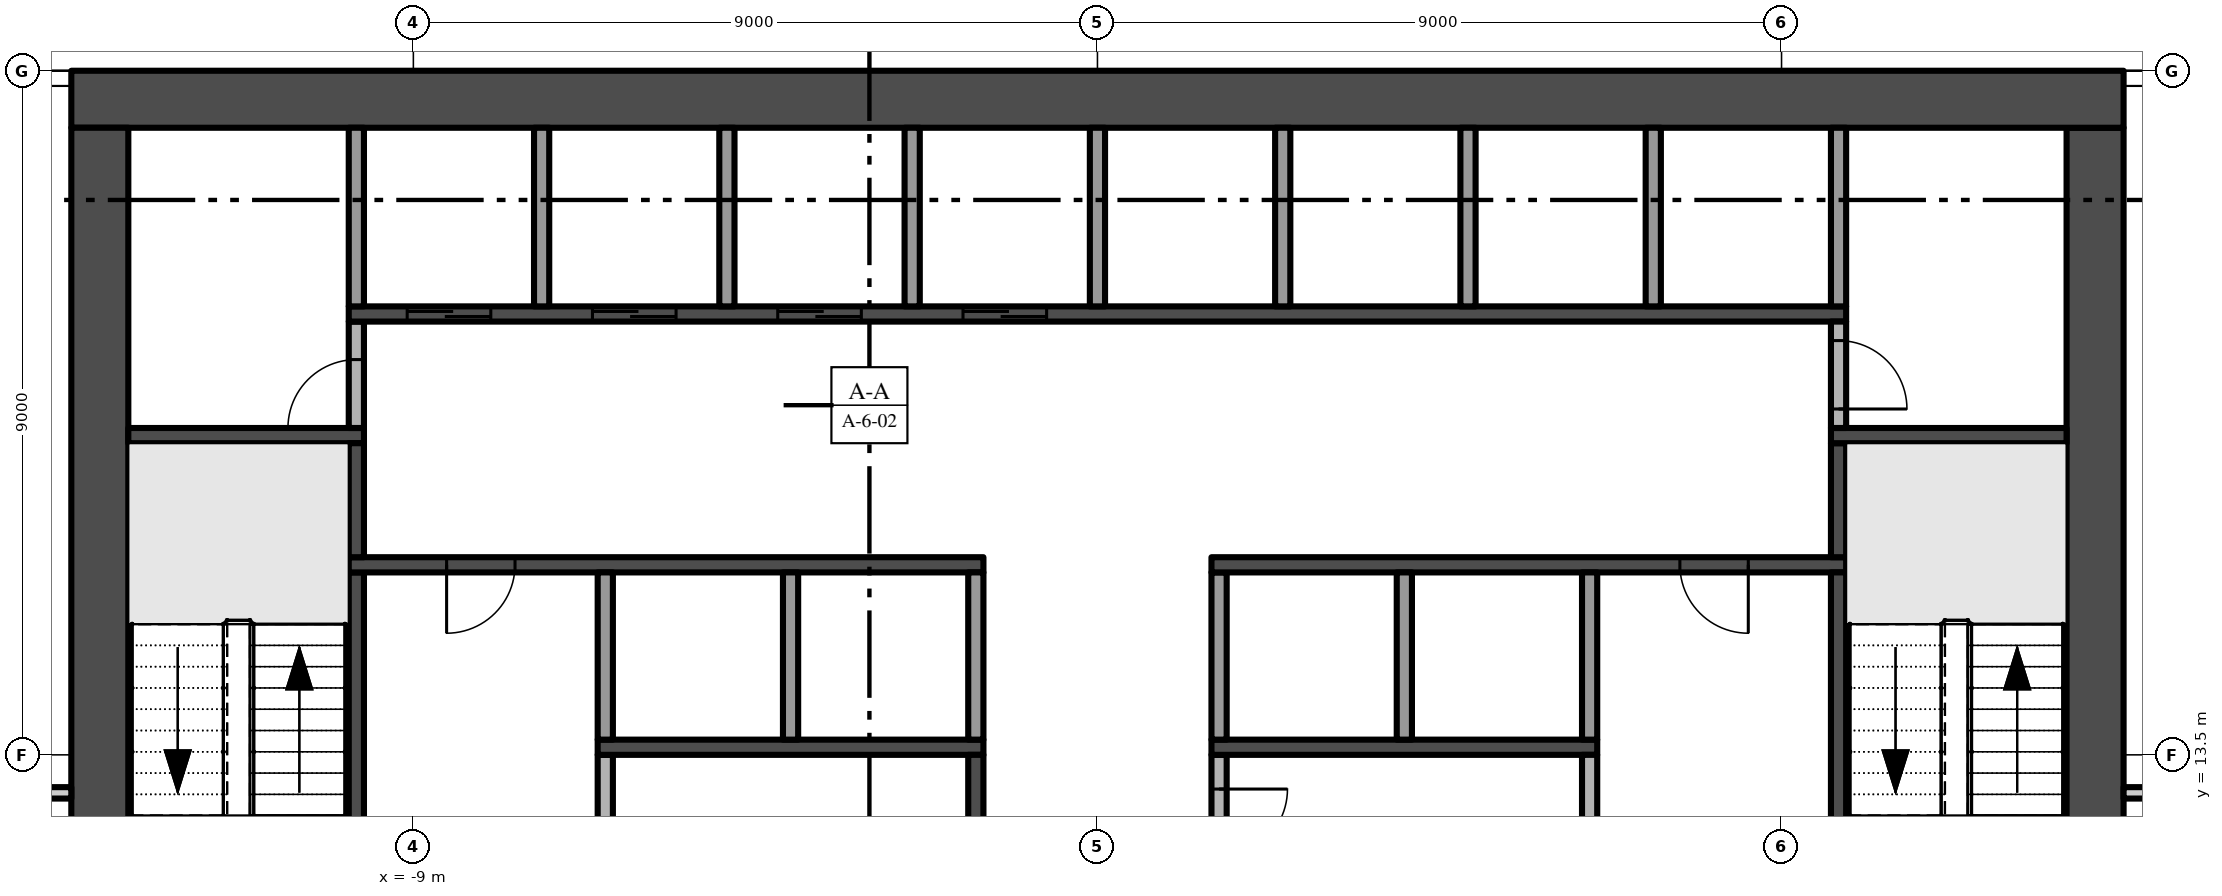
"""IFC4 building model, lengths in metres.
Left out: names, types, materials, properties, quantities, classifications, styles, units other than length and angle.
Written with IfcOpenShell. Run it as: python <this file> out.ifc"""

import sys

from ifc_helpers import new_model, si_unit, direction, frame, frame_2d, origin, place, context, subcontext, project, spatial, rectangle, extrude, element, fill, save


model = new_model("IFC4")
c1 = context("Model", 3, precision=1e-05, world=origin(), true_north=direction((0.0, 1.0)))
c2 = subcontext(c1, "Body", "Model", "MODEL_VIEW")
j1 = project(units=[si_unit("LENGTHUNIT", "METRE"), si_unit("PLANEANGLEUNIT", "RADIAN")], contexts=[c1])
p1 = place(None, origin())
s1 = spatial("IfcSite", under=j1, at=p1, CompositionType="ELEMENT")
p2 = place(p1, origin())
s2 = spatial("IfcBuilding", under=s1, at=p2, CompositionType="ELEMENT")
p3 = place(p2, frame((0.0, 0.0, 115.0)))
s3 = spatial("IfcBuildingStorey", under=s2, at=p3, CompositionType="ELEMENT", Elevation=115.0)
p4 = place(p3, frame((13.125, 5.25, -0.3), z_axis=(0.0, 0.0, 1.0), x_axis=(0.0, 1.0, 0.0)))
e1 = element("IfcWall", 1, at=p4, inside=s3, PredefinedType="SHEAR", context=c2, shape_type="SweptSolid", body=[
    extrude(rectangle(XDim=16.5, YDim=0.75, at=frame_2d((8.25, 0.0))), origin(), (0.0, 0.0, 1.0), 5.0),
])
p5 = place(p4, frame((6.15, 0.0, 0.3)))
e2 = element("IfcOpeningElement", 2, at=p5, cuts=e1, PredefinedType="OPENING", context=c2, shape_type="SweptSolid", body=[
    extrude(rectangle(XDim=1.2, YDim=2.2, at=frame_2d((0.6, 1.1))), frame((0.0, 0.385, 0.0), z_axis=(0.0, -1.0, 0.0), x_axis=(1.0, 0.0, 0.0)), (0.0, 0.0, 1.0), 0.77),
])
p6 = place(p3, frame((13.5, 22.125, -0.3), z_axis=(0.0, 0.0, 1.0), x_axis=(-1.0, 0.0, 0.0)))
e3 = element("IfcWall", 3, at=p6, inside=s3, PredefinedType="SHEAR", context=c2, shape_type="SweptSolid", body=[
    extrude(rectangle(XDim=27.0, YDim=0.75, at=frame_2d((13.5, 0.0))), origin(), (0.0, 0.0, 1.0), 5.0),
])
p7 = place(p3, frame((-13.125, 21.75, -0.3), z_axis=(0.0, 0.0, 1.0), x_axis=(0.0, -1.0, 0.0)))
e4 = element("IfcWall", 4, at=p7, inside=s3, PredefinedType="SHEAR", context=c2, shape_type="SweptSolid", body=[
    extrude(rectangle(XDim=16.5, YDim=0.75, at=frame_2d((8.25, 0.0))), origin(), (0.0, 0.0, 1.0), 5.0),
])
p8 = place(p7, frame((9.15, 0.0, 0.3)))
e5 = element("IfcOpeningElement", 5, at=p8, cuts=e4, PredefinedType="OPENING", context=c2, shape_type="SweptSolid", body=[
    extrude(rectangle(XDim=1.2, YDim=2.2, at=frame_2d((0.6, 1.1))), frame((0.0, 0.385, 0.0), z_axis=(0.0, -1.0, 0.0), x_axis=(1.0, 0.0, 0.0)), (0.0, 0.0, 1.0), 0.77),
])
p9 = place(p3, frame((-12.75, 17.7, 0.0), z_axis=(0.0, 0.0, 1.0), x_axis=(1.0, 0.0, 0.0)))
e6 = element("IfcWall", 6, at=p9, inside=s3, PredefinedType="SHEAR", context=c2, shape_type="SweptSolid", body=[
    extrude(rectangle(XDim=3.1, YDim=0.2, at=frame_2d((1.55, 0.0))), origin(), (0.0, 0.0, 1.0), 4.7),
])
p10 = place(p3, frame((-9.75, 10.2, 0.0), z_axis=(0.0, 0.0, 1.0), x_axis=(0.0, 1.0, 0.0)))
e7 = element("IfcWall", 7, at=p10, inside=s3, PredefinedType="SHEAR", context=c2, shape_type="SweptSolid", body=[
    extrude(rectangle(XDim=5.7, YDim=0.2, at=frame_2d((2.85, 0.0))), origin(), (0.0, 0.0, 1.0), 4.7),
])
p11 = place(p3, frame((-1.5, 16.0, 0.0), z_axis=(0.0, 0.0, 1.0), x_axis=(-1.0, 0.0, 0.0)))
e8 = element("IfcWall", 8, at=p11, inside=s3, PredefinedType="SHEAR", context=c2, shape_type="SweptSolid", body=[
    extrude(rectangle(XDim=8.35, YDim=0.2, at=frame_2d((4.175, 0.0))), origin(), (0.0, 0.0, 1.0), 4.7),
])
p12 = place(p11, frame((6.162, 0.0, 0.0)))
e9 = element("IfcOpeningElement", 9, at=p12, cuts=e8, PredefinedType="OPENING", context=c2, shape_type="SweptSolid", body=[
    extrude(rectangle(XDim=0.9, YDim=2.1, at=frame_2d((0.45, 1.05))), frame((0.0, 0.11, 0.0), z_axis=(0.0, -1.0, 0.0), x_axis=(1.0, 0.0, 0.0)), (0.0, 0.0, 1.0), 0.22),
])
p13 = place(p3, frame((-9.75, 16.1, 0.0), z_axis=(0.0, 0.0, 1.0), x_axis=(0.0, 1.0, 0.0)))
e10 = element("IfcWall", 10, at=p13, inside=s3, PredefinedType="SHEAR", context=c2, shape_type="SweptSolid", body=[
    extrude(rectangle(XDim=1.5, YDim=0.2, at=frame_2d((0.75, 0.0))), origin(), (0.0, 0.0, 1.0), 4.7),
])
p14 = place(p3, frame((-9.75, 17.8, 0.0), z_axis=(0.0, 0.0, 1.0), x_axis=(0.0, 1.0, 0.0)))
e11 = element("IfcWall", 11, at=p14, inside=s3, PredefinedType="PARTITIONING", context=c2, shape_type="SweptSolid", body=[
    extrude(rectangle(XDim=1.4, YDim=0.2, at=frame_2d((0.7, 0.0))), origin(), (0.0, 0.0, 1.0), 4.7),
])
p15 = place(p14, origin())
e12 = element("IfcOpeningElement", 12, at=p15, cuts=e11, PredefinedType="OPENING", context=c2, shape_type="SweptSolid", body=[
    extrude(rectangle(XDim=0.9, YDim=2.1, at=frame_2d((0.45, 1.05))), frame((0.0, 0.11, 0.0), z_axis=(0.0, -1.0, 0.0), x_axis=(1.0, 0.0, 0.0)), (0.0, 0.0, 1.0), 0.22),
])
p16 = place(p3, frame((-9.85, 19.3, 0.0), z_axis=(0.0, 0.0, 1.0), x_axis=(1.0, 0.0, 0.0)))
e13 = element("IfcWall", 13, at=p16, inside=s3, PredefinedType="SHEAR", context=c2, shape_type="SweptSolid", body=[
    extrude(rectangle(XDim=19.7, YDim=0.2, at=frame_2d((9.85, 0.0))), origin(), (0.0, 0.0, 1.0), 4.7),
])
p17 = place(p16, frame((0.769, 0.0, 0.0)))
e14 = element("IfcOpeningElement", 14, at=p17, cuts=e13, PredefinedType="OPENING", context=c2, shape_type="SweptSolid", body=[
    extrude(rectangle(XDim=1.1, YDim=2.1, at=frame_2d((0.55, 1.05))), frame((0.0, 0.11, 0.0), z_axis=(0.0, -1.0, 0.0), x_axis=(1.0, 0.0, 0.0)), (0.0, 0.0, 1.0), 0.22),
])
p18 = place(p16, frame((3.206, 0.0, 0.0)))
e15 = element("IfcOpeningElement", 15, at=p18, cuts=e13, PredefinedType="OPENING", context=c2, shape_type="SweptSolid", body=[
    extrude(rectangle(XDim=1.1, YDim=2.1, at=frame_2d((0.55, 1.05))), frame((0.0, 0.11, 0.0), z_axis=(0.0, -1.0, 0.0), x_axis=(1.0, 0.0, 0.0)), (0.0, 0.0, 1.0), 0.22),
])
p19 = place(p16, frame((5.644, 0.0, 0.0)))
e16 = element("IfcOpeningElement", 16, at=p19, cuts=e13, PredefinedType="OPENING", context=c2, shape_type="SweptSolid", body=[
    extrude(rectangle(XDim=1.1, YDim=2.1, at=frame_2d((0.55, 1.05))), frame((0.0, 0.11, 0.0), z_axis=(0.0, -1.0, 0.0), x_axis=(1.0, 0.0, 0.0)), (0.0, 0.0, 1.0), 0.22),
])
p20 = place(p16, frame((8.081, 0.0, 0.0)))
e17 = element("IfcOpeningElement", 17, at=p20, cuts=e13, PredefinedType="OPENING", context=c2, shape_type="SweptSolid", body=[
    extrude(rectangle(XDim=1.1, YDim=2.1, at=frame_2d((0.55, 1.05))), frame((0.0, 0.11, 0.0), z_axis=(0.0, -1.0, 0.0), x_axis=(1.0, 0.0, 0.0)), (0.0, 0.0, 1.0), 0.22),
])
for number, where, z_axis, x_axis in (
    (18, (-9.75, 19.4, 0.0), (0.0, 0.0, 1.0), (0.0, 1.0, 0.0)),
    (19, (-7.312, 19.4, 0.0), (0.0, 0.0, 1.0), (0.0, 1.0, 0.0)),
):
    element("IfcWall", number, at=place(p3, frame(where, z_axis=z_axis, x_axis=x_axis)), inside=s3, PredefinedType="PARTITIONING", context=c2, shape_type="SweptSolid", body=[
        extrude(rectangle(XDim=2.35, YDim=0.2, at=frame_2d((1.175, 0.0))), origin(), (0.0, 0.0, 1.0), 4.7),
    ])
p21 = place(p3, frame((-6.475, 8.15, 0.0), z_axis=(0.0, 0.0, 1.0), x_axis=(0.0, 1.0, 0.0)))
e20 = element("IfcWall", 20, at=p21, inside=s3, PredefinedType="PARTITIONING", context=c2, shape_type="SweptSolid", body=[
    extrude(rectangle(XDim=5.35, YDim=0.2, at=frame_2d((2.675, 0.0))), origin(), (0.0, 0.0, 1.0), 4.7),
])
p22 = place(p3, frame((-6.575, 13.6, 0.0), z_axis=(0.0, 0.0, 1.0), x_axis=(1.0, 0.0, 0.0)))
e21 = element("IfcWall", 21, at=p22, inside=s3, PredefinedType="SHEAR", context=c2, shape_type="SweptSolid", body=[
    extrude(rectangle(XDim=5.075, YDim=0.2, at=frame_2d((2.538, 0.0))), origin(), (0.0, 0.0, 1.0), 4.7),
])
p23 = place(p3, frame((-6.475, 13.7, 0.0), z_axis=(0.0, 0.0, 1.0), x_axis=(0.0, 1.0, 0.0)))
e22 = element("IfcWall", 22, at=p23, inside=s3, PredefinedType="PARTITIONING", context=c2, shape_type="SweptSolid", body=[
    extrude(rectangle(XDim=2.2, YDim=0.2, at=frame_2d((1.1, 0.0))), origin(), (0.0, 0.0, 1.0), 4.7),
])
p24 = place(p3, frame((-4.875, 19.4, 0.0), z_axis=(0.0, 0.0, 1.0), x_axis=(0.0, 1.0, 0.0)))
e23 = element("IfcWall", 23, at=p24, inside=s3, PredefinedType="PARTITIONING", context=c2, shape_type="SweptSolid", body=[
    extrude(rectangle(XDim=2.35, YDim=0.2, at=frame_2d((1.175, 0.0))), origin(), (0.0, 0.0, 1.0), 4.7),
])
p25 = place(p3, frame((-4.037, 13.7, 0.0), z_axis=(0.0, 0.0, 1.0), x_axis=(0.0, 1.0, 0.0)))
e24 = element("IfcWall", 24, at=p25, inside=s3, PredefinedType="PARTITIONING", context=c2, shape_type="SweptSolid", body=[
    extrude(rectangle(XDim=2.2, YDim=0.2, at=frame_2d((1.1, 0.0))), origin(), (0.0, 0.0, 1.0), 4.7),
])
p26 = place(p3, frame((-2.438, 19.4, 0.0), z_axis=(0.0, 0.0, 1.0), x_axis=(0.0, 1.0, 0.0)))
e25 = element("IfcWall", 25, at=p26, inside=s3, PredefinedType="PARTITIONING", context=c2, shape_type="SweptSolid", body=[
    extrude(rectangle(XDim=2.35, YDim=0.2, at=frame_2d((1.175, 0.0))), origin(), (0.0, 0.0, 1.0), 4.7),
])
p27 = place(p3, frame((-1.6, 8.15, 0.0), z_axis=(0.0, 0.0, 1.0), x_axis=(0.0, 1.0, 0.0)))
e26 = element("IfcWall", 26, at=p27, inside=s3, PredefinedType="SHEAR", context=c2, shape_type="SweptSolid", body=[
    extrude(rectangle(XDim=5.35, YDim=0.2, at=frame_2d((2.675, 0.0))), origin(), (0.0, 0.0, 1.0), 4.7),
])
p28 = place(p27, frame((2.225, 0.0, 0.0)))
e27 = element("IfcOpeningElement", 27, at=p28, cuts=e26, PredefinedType="OPENING", context=c2, shape_type="SweptSolid", body=[
    extrude(rectangle(XDim=0.9, YDim=2.1, at=frame_2d((0.45, 1.05))), frame((0.0, 0.11, 0.0), z_axis=(0.0, -1.0, 0.0), x_axis=(1.0, 0.0, 0.0)), (0.0, 0.0, 1.0), 0.22),
])
p29 = place(p3, frame((-1.6, 13.7, 0.0), z_axis=(0.0, 0.0, 1.0), x_axis=(0.0, 1.0, 0.0)))
e28 = element("IfcWall", 28, at=p29, inside=s3, PredefinedType="PARTITIONING", context=c2, shape_type="SweptSolid", body=[
    extrude(rectangle(XDim=2.2, YDim=0.2, at=frame_2d((1.1, 0.0))), origin(), (0.0, 0.0, 1.0), 4.7),
])
p30 = place(p3, frame((0.0, 19.4, 0.0), z_axis=(0.0, 0.0, 1.0), x_axis=(0.0, 1.0, 0.0)))
e29 = element("IfcWall", 29, at=p30, inside=s3, PredefinedType="PARTITIONING", context=c2, shape_type="SweptSolid", body=[
    extrude(rectangle(XDim=2.35, YDim=0.2, at=frame_2d((1.175, 0.0))), origin(), (0.0, 0.0, 1.0), 4.7),
])
p31 = place(p3, frame((1.6, 13.5, 0.0), z_axis=(0.0, 0.0, 1.0), x_axis=(0.0, -1.0, 0.0)))
e30 = element("IfcWall", 30, at=p31, inside=s3, PredefinedType="PARTITIONING", context=c2, shape_type="SweptSolid", body=[
    extrude(rectangle(XDim=1.8, YDim=0.2, at=frame_2d((0.9, 0.0))), origin(), (0.0, 0.0, 1.0), 4.7),
])
p32 = place(p31, frame((0.45, 0.0, 0.0)))
e31 = element("IfcOpeningElement", 31, at=p32, cuts=e30, PredefinedType="OPENING", context=c2, shape_type="SweptSolid", body=[
    extrude(rectangle(XDim=0.9, YDim=2.1, at=frame_2d((0.45, 1.05))), frame((0.0, 0.11, 0.0), z_axis=(0.0, -1.0, 0.0), x_axis=(1.0, 0.0, 0.0)), (0.0, 0.0, 1.0), 0.22),
])
p33 = place(p3, frame((1.5, 13.6, 0.0), z_axis=(0.0, 0.0, 1.0), x_axis=(1.0, 0.0, 0.0)))
e32 = element("IfcWall", 32, at=p33, inside=s3, PredefinedType="SHEAR", context=c2, shape_type="SweptSolid", body=[
    extrude(rectangle(XDim=5.075, YDim=0.2, at=frame_2d((2.538, 0.0))), origin(), (0.0, 0.0, 1.0), 4.7),
])
p34 = place(p3, frame((1.6, 13.7, 0.0), z_axis=(0.0, 0.0, 1.0), x_axis=(0.0, 1.0, 0.0)))
e33 = element("IfcWall", 33, at=p34, inside=s3, PredefinedType="PARTITIONING", context=c2, shape_type="SweptSolid", body=[
    extrude(rectangle(XDim=2.2, YDim=0.2, at=frame_2d((1.1, 0.0))), origin(), (0.0, 0.0, 1.0), 4.7),
])
p35 = place(p3, frame((9.85, 16.0, 0.0), z_axis=(0.0, 0.0, 1.0), x_axis=(-1.0, 0.0, 0.0)))
e34 = element("IfcWall", 34, at=p35, inside=s3, PredefinedType="SHEAR", context=c2, shape_type="SweptSolid", body=[
    extrude(rectangle(XDim=8.35, YDim=0.2, at=frame_2d((4.175, 0.0))), origin(), (0.0, 0.0, 1.0), 4.7),
])
p36 = place(p35, frame((1.288, 0.0, 0.0)))
e35 = element("IfcOpeningElement", 35, at=p36, cuts=e34, PredefinedType="OPENING", context=c2, shape_type="SweptSolid", body=[
    extrude(rectangle(XDim=0.9, YDim=2.1, at=frame_2d((0.45, 1.05))), frame((0.0, 0.11, 0.0), z_axis=(0.0, -1.0, 0.0), x_axis=(1.0, 0.0, 0.0)), (0.0, 0.0, 1.0), 0.22),
])
p37 = place(p3, frame((2.438, 19.4, 0.0), z_axis=(0.0, 0.0, 1.0), x_axis=(0.0, 1.0, 0.0)))
e36 = element("IfcWall", 36, at=p37, inside=s3, PredefinedType="PARTITIONING", context=c2, shape_type="SweptSolid", body=[
    extrude(rectangle(XDim=2.35, YDim=0.2, at=frame_2d((1.175, 0.0))), origin(), (0.0, 0.0, 1.0), 4.7),
])
p38 = place(p3, frame((4.037, 13.7, 0.0), z_axis=(0.0, 0.0, 1.0), x_axis=(0.0, 1.0, 0.0)))
e37 = element("IfcWall", 37, at=p38, inside=s3, PredefinedType="PARTITIONING", context=c2, shape_type="SweptSolid", body=[
    extrude(rectangle(XDim=2.2, YDim=0.2, at=frame_2d((1.1, 0.0))), origin(), (0.0, 0.0, 1.0), 4.7),
])
p39 = place(p3, frame((4.875, 19.4, 0.0), z_axis=(0.0, 0.0, 1.0), x_axis=(0.0, 1.0, 0.0)))
e38 = element("IfcWall", 38, at=p39, inside=s3, PredefinedType="PARTITIONING", context=c2, shape_type="SweptSolid", body=[
    extrude(rectangle(XDim=2.35, YDim=0.2, at=frame_2d((1.175, 0.0))), origin(), (0.0, 0.0, 1.0), 4.7),
])
p40 = place(p3, frame((6.475, 12.3, 0.0), z_axis=(0.0, 0.0, 1.0), x_axis=(0.0, 1.0, 0.0)))
e39 = element("IfcWall", 39, at=p40, inside=s3, PredefinedType="PARTITIONING", context=c2, shape_type="SweptSolid", body=[
    extrude(rectangle(XDim=1.2, YDim=0.2, at=frame_2d((0.6, 0.0))), origin(), (0.0, 0.0, 1.0), 4.7),
])
p41 = place(p3, frame((6.475, 13.7, 0.0), z_axis=(0.0, 0.0, 1.0), x_axis=(0.0, 1.0, 0.0)))
e40 = element("IfcWall", 40, at=p41, inside=s3, PredefinedType="PARTITIONING", context=c2, shape_type="SweptSolid", body=[
    extrude(rectangle(XDim=2.2, YDim=0.2, at=frame_2d((1.1, 0.0))), origin(), (0.0, 0.0, 1.0), 4.7),
])
p42 = place(p3, frame((7.312, 19.4, 0.0), z_axis=(0.0, 0.0, 1.0), x_axis=(0.0, 1.0, 0.0)))
e41 = element("IfcWall", 41, at=p42, inside=s3, PredefinedType="PARTITIONING", context=c2, shape_type="SweptSolid", body=[
    extrude(rectangle(XDim=2.35, YDim=0.2, at=frame_2d((1.175, 0.0))), origin(), (0.0, 0.0, 1.0), 4.7),
])
p43 = place(p3, frame((9.75, 12.3, 0.0), z_axis=(0.0, 0.0, 1.0), x_axis=(0.0, 1.0, 0.0)))
e42 = element("IfcWall", 42, at=p43, inside=s3, PredefinedType="SHEAR", context=c2, shape_type="SweptSolid", body=[
    extrude(rectangle(XDim=3.6, YDim=0.2, at=frame_2d((1.8, 0.0))), origin(), (0.0, 0.0, 1.0), 4.7),
])
p44 = place(p3, frame((9.75, 16.1, 0.0), z_axis=(0.0, 0.0, 1.0), x_axis=(0.0, 1.0, 0.0)))
e43 = element("IfcWall", 43, at=p44, inside=s3, PredefinedType="SHEAR", context=c2, shape_type="SweptSolid", body=[
    extrude(rectangle(XDim=1.5, YDim=0.2, at=frame_2d((0.75, 0.0))), origin(), (0.0, 0.0, 1.0), 4.7),
])
p45 = place(p3, frame((9.65, 17.7, 0.0), z_axis=(0.0, 0.0, 1.0), x_axis=(1.0, 0.0, 0.0)))
e44 = element("IfcWall", 44, at=p45, inside=s3, PredefinedType="SHEAR", context=c2, shape_type="SweptSolid", body=[
    extrude(rectangle(XDim=3.1, YDim=0.2, at=frame_2d((1.55, 0.0))), origin(), (0.0, 0.0, 1.0), 4.7),
])
p46 = place(p3, frame((9.75, 19.2, 0.0), z_axis=(0.0, 0.0, 1.0), x_axis=(0.0, -1.0, 0.0)))
e45 = element("IfcWall", 45, at=p46, inside=s3, PredefinedType="PARTITIONING", context=c2, shape_type="SweptSolid", body=[
    extrude(rectangle(XDim=1.4, YDim=0.2, at=frame_2d((0.7, 0.0))), origin(), (0.0, 0.0, 1.0), 4.7),
])
p47 = place(p46, frame((0.25, 0.0, 0.0)))
e46 = element("IfcOpeningElement", 46, at=p47, cuts=e45, PredefinedType="OPENING", context=c2, shape_type="SweptSolid", body=[
    extrude(rectangle(XDim=0.9, YDim=2.1, at=frame_2d((0.45, 1.05))), frame((0.0, 0.11, 0.0), z_axis=(0.0, -1.0, 0.0), x_axis=(1.0, 0.0, 0.0)), (0.0, 0.0, 1.0), 0.22),
])
p48 = place(p3, frame((9.75, 19.4, 0.0), z_axis=(0.0, 0.0, 1.0), x_axis=(0.0, 1.0, 0.0)))
e47 = element("IfcWall", 47, at=p48, inside=s3, PredefinedType="PARTITIONING", context=c2, shape_type="SweptSolid", body=[
    extrude(rectangle(XDim=2.35, YDim=0.2, at=frame_2d((1.175, 0.0))), origin(), (0.0, 0.0, 1.0), 4.7),
])
for number, where, z_axis, x_axis in (
    (48, (-17.325, 13.0, 0.0), (0.0, 0.0, 1.0), (1.0, 0.0, 0.0)),
    (49, (13.5, 13.0, 0.0), (0.0, 0.0, 1.0), (1.0, 0.0, 0.0)),
):
    element("IfcWall", number, at=place(p3, frame(where, z_axis=z_axis, x_axis=x_axis)), inside=s3, PredefinedType="PARTITIONING", context=c2, shape_type="SweptSolid", body=[
        extrude(rectangle(XDim=3.825, YDim=0.15, at=frame_2d((1.913, 0.0))), origin(), (0.0, 0.0, 1.0), 4.7),
    ])
p49 = place(p17, origin())
e50 = element("IfcDoor", 50, at=p49, inside=s3, OperationType="SLIDING_TO_LEFT", PredefinedType="DOOR", context=c2, shape_type="SweptSolid", body=[
    extrude(rectangle(XDim=1.1, YDim=2.1, at=frame_2d((0.55, 1.05))), frame((0.0, 0.025, 0.0), z_axis=(0.0, -1.0, 0.0), x_axis=(1.0, 0.0, 0.0)), (0.0, 0.0, 1.0), 0.05),
])
fill(e14, e50)
p50 = place(p18, origin())
e51 = element("IfcDoor", 51, at=p50, inside=s3, OperationType="SLIDING_TO_LEFT", PredefinedType="DOOR", context=c2, shape_type="SweptSolid", body=[
    extrude(rectangle(XDim=1.1, YDim=2.1, at=frame_2d((0.55, 1.05))), frame((0.0, 0.025, 0.0), z_axis=(0.0, -1.0, 0.0), x_axis=(1.0, 0.0, 0.0)), (0.0, 0.0, 1.0), 0.05),
])
fill(e15, e51)
p51 = place(p19, origin())
e52 = element("IfcDoor", 52, at=p51, inside=s3, OperationType="SLIDING_TO_LEFT", PredefinedType="DOOR", context=c2, shape_type="SweptSolid", body=[
    extrude(rectangle(XDim=1.1, YDim=2.1, at=frame_2d((0.55, 1.05))), frame((0.0, 0.025, 0.0), z_axis=(0.0, -1.0, 0.0), x_axis=(1.0, 0.0, 0.0)), (0.0, 0.0, 1.0), 0.05),
])
fill(e16, e52)
p52 = place(p20, origin())
e53 = element("IfcDoor", 53, at=p52, inside=s3, OperationType="SLIDING_TO_LEFT", PredefinedType="DOOR", context=c2, shape_type="SweptSolid", body=[
    extrude(rectangle(XDim=1.1, YDim=2.1, at=frame_2d((0.55, 1.05))), frame((0.0, 0.025, 0.0), z_axis=(0.0, -1.0, 0.0), x_axis=(1.0, 0.0, 0.0)), (0.0, 0.0, 1.0), 0.05),
])
fill(e17, e53)
p53 = place(p12, origin())
e54 = element("IfcDoor", 54, at=p53, inside=s3, OperationType="SINGLE_SWING_RIGHT", PredefinedType="DOOR", context=c2, shape_type="SweptSolid", body=[
    extrude(rectangle(XDim=0.9, YDim=2.1, at=frame_2d((0.45, 1.05))), frame((0.0, 0.025, 0.0), z_axis=(0.0, -1.0, 0.0), x_axis=(1.0, 0.0, 0.0)), (0.0, 0.0, 1.0), 0.05),
])
fill(e9, e54)
p54 = place(p32, origin())
e55 = element("IfcDoor", 55, at=p54, inside=s3, OperationType="SINGLE_SWING_LEFT", PredefinedType="DOOR", context=c2, shape_type="SweptSolid", body=[
    extrude(rectangle(XDim=0.9, YDim=2.1, at=frame_2d((0.45, 1.05))), frame((0.0, 0.025, 0.0), z_axis=(0.0, -1.0, 0.0), x_axis=(1.0, 0.0, 0.0)), (0.0, 0.0, 1.0), 0.05),
])
fill(e31, e55)
p55 = place(p36, origin())
e56 = element("IfcDoor", 56, at=p55, inside=s3, OperationType="SINGLE_SWING_LEFT", PredefinedType="DOOR", context=c2, shape_type="SweptSolid", body=[
    extrude(rectangle(XDim=0.9, YDim=2.1, at=frame_2d((0.45, 1.05))), frame((0.0, 0.025, 0.0), z_axis=(0.0, -1.0, 0.0), x_axis=(1.0, 0.0, 0.0)), (0.0, 0.0, 1.0), 0.05),
])
fill(e35, e56)
p56 = place(p15, origin())
e57 = element("IfcDoor", 57, at=p56, inside=s3, OperationType="SINGLE_SWING_LEFT", PredefinedType="DOOR", context=c2, shape_type="SweptSolid", body=[
    extrude(rectangle(XDim=0.9, YDim=2.1, at=frame_2d((0.45, 1.05))), frame((0.0, 0.025, 0.0), z_axis=(0.0, -1.0, 0.0), x_axis=(1.0, 0.0, 0.0)), (0.0, 0.0, 1.0), 0.05),
])
fill(e12, e57)
p57 = place(p47, origin())
e58 = element("IfcDoor", 58, at=p57, inside=s3, OperationType="SINGLE_SWING_RIGHT", PredefinedType="DOOR", context=c2, shape_type="SweptSolid", body=[
    extrude(rectangle(XDim=0.9, YDim=2.1, at=frame_2d((0.45, 1.05))), frame((0.0, 0.025, 0.0), z_axis=(0.0, -1.0, 0.0), x_axis=(1.0, 0.0, 0.0)), (0.0, 0.0, 1.0), 0.05),
])
fill(e46, e58)
save(model, sys.argv[1])
